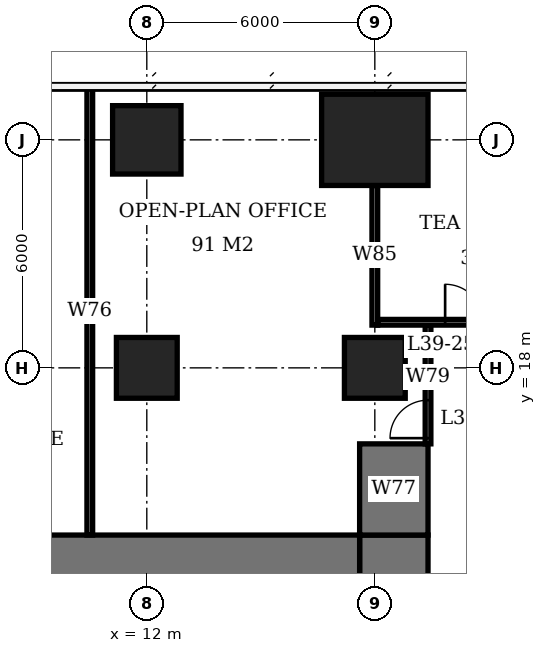
"""IFC4 building model, lengths in metres.
Left out: names, types, materials, properties, quantities, classifications, styles, units other than length and angle.
Written with IfcOpenShell. Run it as: python <this file> out.ifc"""

import sys

from ifc_helpers import new_model, si_unit, direction, frame, frame_2d, origin, origin_2d, place, context, subcontext, project, spatial, rectangle, extrude, element, fill, save


model = new_model("IFC4")
c1 = context("Model", 3, precision=1e-05, world=origin(), true_north=direction((0.0, 1.0)))
c2 = subcontext(c1, "Body", "Model", "MODEL_VIEW")
j1 = project(units=[si_unit("LENGTHUNIT", "METRE"), si_unit("PLANEANGLEUNIT", "RADIAN")], contexts=[c1])
p1 = place(None, origin())
s1 = spatial("IfcSite", under=j1, at=p1, CompositionType="ELEMENT")
p2 = place(p1, origin())
s2 = spatial("IfcBuilding", under=s1, at=p2, CompositionType="ELEMENT")
p3 = place(p2, frame((0.0, 0.0, 160.1)))
s3 = spatial("IfcBuildingStorey", under=s2, at=p3, CompositionType="ELEMENT", Elevation=160.1)
p4 = place(p3, frame((12.0, 18.0, 0.0), z_axis=(0.0, 0.0, 1.0), x_axis=(1.0, 0.0, 0.0)))
e1 = element("IfcColumn", 1, at=p4, inside=s3, PredefinedType="COLUMN", context=c2, shape_type="SweptSolid", body=[
    extrude(rectangle(XDim=1.6, YDim=1.6, at=origin_2d()), origin(), (0.0, 0.0, 1.0), 3.9),
])
p5 = place(p3, frame((12.0, 24.0, 0.0), z_axis=(0.0, 0.0, 1.0), x_axis=(1.0, 0.0, 0.0)))
e2 = element("IfcColumn", 2, at=p5, inside=s3, PredefinedType="COLUMN", context=c2, shape_type="SweptSolid", body=[
    extrude(rectangle(XDim=1.8, YDim=1.8, at=origin_2d()), origin(), (0.0, 0.0, 1.0), 3.9),
])
p6 = place(p3, frame((18.0, 18.0, 0.0), z_axis=(0.0, 0.0, 1.0), x_axis=(1.0, 0.0, 0.0)))
e3 = element("IfcColumn", 3, at=p6, inside=s3, PredefinedType="COLUMN", context=c2, shape_type="SweptSolid", body=[
    extrude(rectangle(XDim=1.6, YDim=1.6, at=origin_2d()), origin(), (0.0, 0.0, 1.0), 3.9),
])
p7 = place(p3, frame((18.0, 24.0, 0.0), z_axis=(0.0, 0.0, 1.0), x_axis=(1.0, 0.0, 0.0)))
e4 = element("IfcColumn", 4, at=p7, inside=s3, PredefinedType="COLUMN", context=c2, shape_type="SweptSolid", body=[
    extrude(rectangle(XDim=2.8, YDim=2.4, at=origin_2d()), origin(), (0.0, 0.0, 1.0), 3.9),
])
p8 = place(p3, frame((-5.6, 12.6, 0.0), z_axis=(0.0, 0.0, 1.0), x_axis=(1.0, 0.0, 0.0)))
e5 = element("IfcWall", 5, at=p8, inside=s3, PredefinedType="SHEAR", context=c2, shape_type="SweptSolid", body=[
    extrude(rectangle(XDim=23.2, YDim=2.0, at=frame_2d((11.6, 0.0))), origin(), (0.0, 0.0, 1.0), 3.9),
])
p9 = place(p3, frame((18.5, -7.6, 0.0), z_axis=(0.0, 0.0, 1.0), x_axis=(0.0, 1.0, 0.0)))
e6 = element("IfcWall", 6, at=p9, inside=s3, PredefinedType="SHEAR", context=c2, shape_type="SweptSolid", body=[
    extrude(rectangle(XDim=21.2, YDim=1.8, at=frame_2d((10.6, 0.0))), origin(), (0.0, 0.0, 1.0), 3.9),
])
p10 = place(p9, frame((9.2, 0.0, 0.0)))
e7 = element("IfcOpeningElement", 7, at=p10, cuts=e6, PredefinedType="OPENING", context=c2, shape_type="SweptSolid", body=[
    extrude(rectangle(XDim=1.8, YDim=2.4, at=frame_2d((0.9, 1.2))), frame((0.0, 0.91, 0.0), z_axis=(0.0, -1.0, 0.0), x_axis=(1.0, 0.0, 0.0)), (0.0, 0.0, 1.0), 1.82),
])
p11 = place(p3, frame((18.5, 13.6, 0.0), z_axis=(0.0, 0.0, 1.0), x_axis=(0.0, 1.0, 0.0)))
e8 = element("IfcWall", 8, at=p11, inside=s3, PredefinedType="SHEAR", context=c2, shape_type="SweptSolid", body=[
    extrude(rectangle(XDim=2.4, YDim=1.8, at=frame_2d((1.2, 0.0))), origin(), (0.0, 0.0, 1.0), 3.9),
])
p12 = place(p3, frame((18.075, 19.2, 0.0), z_axis=(0.0, 0.0, 1.0), x_axis=(1.0, 0.0, 0.0)))
e9 = element("IfcWall", 9, at=p12, inside=s3, PredefinedType="PARTITIONING", context=c2, shape_type="SweptSolid", body=[
    extrude(rectangle(XDim=4.625, YDim=0.15, at=frame_2d((2.312, 0.0))), origin(), (0.0, 0.0, 1.0), 3.65),
])
p13 = place(p12, frame((1.775, 0.0, 0.0)))
e10 = element("IfcOpeningElement", 10, at=p13, cuts=e9, PredefinedType="OPENING", context=c2, shape_type="SweptSolid", body=[
    extrude(rectangle(XDim=1.0, YDim=2.1, at=frame_2d((0.5, 1.05))), frame((0.0, 0.085, 0.0), z_axis=(0.0, -1.0, 0.0), x_axis=(1.0, 0.0, 0.0)), (0.0, 0.0, 1.0), 0.17),
])
p14 = place(p3, frame((18.0, 19.125, 0.0), z_axis=(0.0, 0.0, 1.0), x_axis=(0.0, 1.0, 0.0)))
e11 = element("IfcWall", 11, at=p14, inside=s3, PredefinedType="PARTITIONING", context=c2, shape_type="SweptSolid", body=[
    extrude(rectangle(XDim=3.675, YDim=0.15, at=frame_2d((1.837, 0.0))), origin(), (0.0, 0.0, 1.0), 3.65),
])
p15 = place(p3, frame((10.5, 13.6, 0.0), z_axis=(0.0, 0.0, 1.0), x_axis=(0.0, 1.0, 0.0)))
e12 = element("IfcWall", 12, at=p15, inside=s3, PredefinedType="PARTITIONING", context=c2, shape_type="SweptSolid", body=[
    extrude(rectangle(XDim=11.8, YDim=0.15, at=frame_2d((5.9, 0.0))), origin(), (0.0, 0.0, 1.0), 3.65),
])
p16 = place(p3, frame((19.4, 16.0, 0.0), z_axis=(0.0, 0.0, 1.0), x_axis=(0.0, 1.0, 0.0)))
e13 = element("IfcWall", 13, at=p16, inside=s3, PredefinedType="PARTITIONING", context=c2, shape_type="SweptSolid", body=[
    extrude(rectangle(XDim=3.125, YDim=0.15, at=frame_2d((1.562, 0.0))), origin(), (0.0, 0.0, 1.0), 3.65),
])
p17 = place(p16, frame((0.15, 0.0, 0.0)))
e14 = element("IfcOpeningElement", 14, at=p17, cuts=e13, PredefinedType="OPENING", context=c2, shape_type="SweptSolid", body=[
    extrude(rectangle(XDim=1.0, YDim=2.1, at=frame_2d((0.5, 1.05))), frame((0.0, 0.085, 0.0), z_axis=(0.0, -1.0, 0.0), x_axis=(1.0, 0.0, 0.0)), (0.0, 0.0, 1.0), 0.17),
])
p18 = place(p13, origin())
e15 = element("IfcDoor", 15, at=p18, inside=s3, OperationType="SINGLE_SWING_LEFT", PredefinedType="DOOR", context=c2, shape_type="SweptSolid", body=[
    extrude(rectangle(XDim=1.0, YDim=2.1, at=frame_2d((0.5, 1.05))), frame((0.0, 0.025, 0.0), z_axis=(0.0, -1.0, 0.0), x_axis=(1.0, 0.0, 0.0)), (0.0, 0.0, 1.0), 0.05),
])
fill(e10, e15)
p19 = place(p17, origin())
e16 = element("IfcDoor", 16, at=p19, inside=s3, OperationType="SINGLE_SWING_LEFT", PredefinedType="DOOR", context=c2, shape_type="SweptSolid", body=[
    extrude(rectangle(XDim=1.0, YDim=2.1, at=frame_2d((0.5, 1.05))), frame((0.0, 0.025, 0.0), z_axis=(0.0, -1.0, 0.0), x_axis=(1.0, 0.0, 0.0)), (0.0, 0.0, 1.0), 0.05),
])
fill(e14, e16)
save(model, sys.argv[1])
